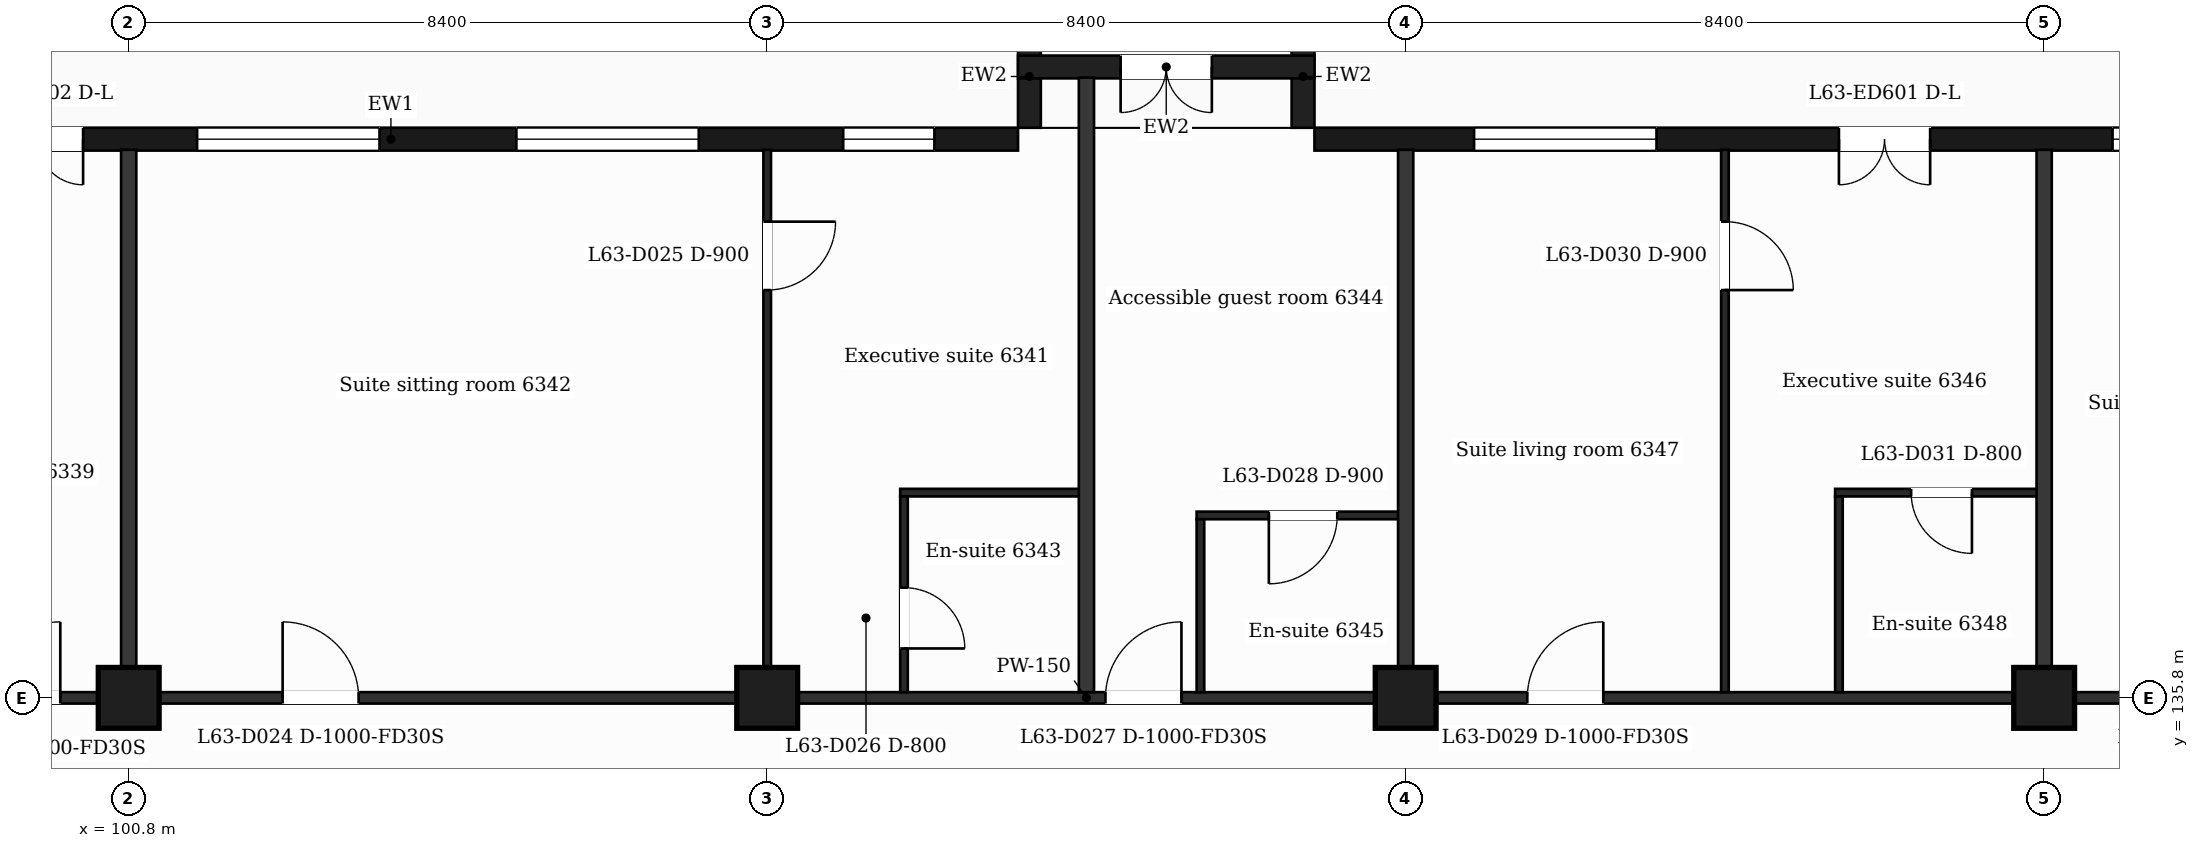
"""IFC4 building model, lengths in metres.
Left out: names, types, materials, properties, quantities, classifications, styles, units other than length and angle.
Written with IfcOpenShell. Run it as: python <this file> out.ifc"""

import sys

from ifc_helpers import new_model, si_unit, direction, frame, frame_2d, origin, origin_2d, place, context, subcontext, project, spatial, rectangle, extrude, element, fill, save


model = new_model("IFC4")
c1 = context("Model", 3, precision=1e-05, world=origin(), true_north=direction((0.0, 1.0)))
c2 = subcontext(c1, "Body", "Model", "MODEL_VIEW")
j1 = project(units=[si_unit("LENGTHUNIT", "METRE"), si_unit("PLANEANGLEUNIT", "RADIAN")], contexts=[c1])
p1 = place(None, origin())
s1 = spatial("IfcSite", under=j1, at=p1, CompositionType="ELEMENT")
p2 = place(p1, origin())
s2 = spatial("IfcBuilding", under=s1, at=p2, CompositionType="ELEMENT")
p3 = place(p2, frame((0.0, 0.0, 262.7)))
s3 = spatial("IfcBuildingStorey", under=s2, at=p3, CompositionType="ELEMENT", Elevation=262.7)
for number, where, z_axis, x_axis in (
    (1, (100.8, 135.8, 0.0), (0.0, 0.0, 1.0), (1.0, 0.0, 0.0)),
    (2, (109.2, 135.8, 0.0), (0.0, 0.0, 1.0), (1.0, 0.0, 0.0)),
    (3, (117.6, 135.8, 0.0), (0.0, 0.0, 1.0), (1.0, 0.0, 0.0)),
    (4, (126.0, 135.8, 0.0), (0.0, 0.0, 1.0), (1.0, 0.0, 0.0)),
):
    element("IfcColumn", number, at=place(p3, frame(where, z_axis=z_axis, x_axis=x_axis)), inside=s3, PredefinedType="COLUMN", context=c2, shape_type="SweptSolid", body=[
        extrude(rectangle(XDim=0.8, YDim=0.8, at=origin_2d()), origin(), (0.0, 0.0, 1.0), 3.7),
    ])
p4 = place(p3, frame((130.65, 143.15, 0.0), z_axis=(0.0, 0.0, 1.0), x_axis=(-1.0, 0.0, 0.0)))
e5 = element("IfcWall", 5, at=p4, inside=s3, PredefinedType="SOLIDWALL", context=c2, shape_type="SweptSolid", body=[
    extrude(rectangle(XDim=14.25, YDim=0.3, at=frame_2d((7.125, 0.0))), origin(), (0.0, 0.0, 1.0), 3.38),
])
p5 = place(p4, frame((1.35, 0.0, 0.9)))
e6 = element("IfcOpeningElement", 6, at=p5, cuts=e5, PredefinedType="OPENING", context=c2, shape_type="SweptSolid", body=[
    extrude(rectangle(XDim=2.4, YDim=2.1, at=frame_2d((1.2, 1.05))), frame((0.0, 0.16, 0.0), z_axis=(0.0, -1.0, 0.0), x_axis=(1.0, 0.0, 0.0)), (0.0, 0.0, 1.0), 0.32),
])
p6 = place(p4, frame((6.15, 0.0, 0.0)))
e7 = element("IfcOpeningElement", 7, at=p6, cuts=e5, PredefinedType="OPENING", context=c2, shape_type="SweptSolid", body=[
    extrude(rectangle(XDim=1.2, YDim=2.4, at=frame_2d((0.6, 1.2))), frame((0.0, 0.16, 0.0), z_axis=(0.0, -1.0, 0.0), x_axis=(1.0, 0.0, 0.0)), (0.0, 0.0, 1.0), 0.32),
])
p7 = place(p4, frame((9.75, 0.0, 0.9)))
e8 = element("IfcOpeningElement", 8, at=p7, cuts=e5, PredefinedType="OPENING", context=c2, shape_type="SweptSolid", body=[
    extrude(rectangle(XDim=2.4, YDim=2.1, at=frame_2d((1.2, 1.05))), frame((0.0, 0.16, 0.0), z_axis=(0.0, -1.0, 0.0), x_axis=(1.0, 0.0, 0.0)), (0.0, 0.0, 1.0), 0.32),
])
p8 = place(p3, frame((112.5, 143.15, 0.0), z_axis=(0.0, 0.0, 1.0), x_axis=(-1.0, 0.0, 0.0)))
e9 = element("IfcWall", 9, at=p8, inside=s3, PredefinedType="SOLIDWALL", context=c2, shape_type="SweptSolid", body=[
    extrude(rectangle(XDim=16.5, YDim=0.3, at=frame_2d((8.25, 0.0))), origin(), (0.0, 0.0, 1.0), 3.38),
])
p9 = place(p8, frame((1.1, 0.0, 0.9)))
e10 = element("IfcOpeningElement", 10, at=p9, cuts=e9, PredefinedType="OPENING", context=c2, shape_type="SweptSolid", body=[
    extrude(rectangle(XDim=1.2, YDim=2.1, at=frame_2d((0.6, 1.05))), frame((0.0, 0.16, 0.0), z_axis=(0.0, -1.0, 0.0), x_axis=(1.0, 0.0, 0.0)), (0.0, 0.0, 1.0), 0.32),
])
p10 = place(p8, frame((4.2, 0.0, 0.9)))
e11 = element("IfcOpeningElement", 11, at=p10, cuts=e9, PredefinedType="OPENING", context=c2, shape_type="SweptSolid", body=[
    extrude(rectangle(XDim=2.4, YDim=2.1, at=frame_2d((1.2, 1.05))), frame((0.0, 0.16, 0.0), z_axis=(0.0, -1.0, 0.0), x_axis=(1.0, 0.0, 0.0)), (0.0, 0.0, 1.0), 0.32),
])
p11 = place(p8, frame((8.4, 0.0, 0.9)))
e12 = element("IfcOpeningElement", 12, at=p11, cuts=e9, PredefinedType="OPENING", context=c2, shape_type="SweptSolid", body=[
    extrude(rectangle(XDim=2.4, YDim=2.1, at=frame_2d((1.2, 1.05))), frame((0.0, 0.16, 0.0), z_axis=(0.0, -1.0, 0.0), x_axis=(1.0, 0.0, 0.0)), (0.0, 0.0, 1.0), 0.32),
])
p12 = place(p8, frame((12.3, 0.0, 0.0)))
e13 = element("IfcOpeningElement", 13, at=p12, cuts=e9, PredefinedType="OPENING", context=c2, shape_type="SweptSolid", body=[
    extrude(rectangle(XDim=1.2, YDim=2.4, at=frame_2d((0.6, 1.2))), frame((0.0, 0.16, 0.0), z_axis=(0.0, -1.0, 0.0), x_axis=(1.0, 0.0, 0.0)), (0.0, 0.0, 1.0), 0.32),
])
p13 = place(p8, frame((14.1, 0.0, 0.9)))
e14 = element("IfcOpeningElement", 14, at=p13, cuts=e9, PredefinedType="OPENING", context=c2, shape_type="SweptSolid", body=[
    extrude(rectangle(XDim=1.2, YDim=2.1, at=frame_2d((0.6, 1.05))), frame((0.0, 0.16, 0.0), z_axis=(0.0, -1.0, 0.0), x_axis=(1.0, 0.0, 0.0)), (0.0, 0.0, 1.0), 0.32),
])
for number, where, z_axis, x_axis in (
    (15, (116.25, 143.3, 0.0), (0.0, 0.0, 1.0), (0.0, 1.0, 0.0)),
    (16, (112.65, 143.3, 0.0), (0.0, 0.0, 1.0), (0.0, 1.0, 0.0)),
):
    element("IfcWall", number, at=place(p3, frame(where, z_axis=z_axis, x_axis=x_axis)), inside=s3, PredefinedType="SOLIDWALL", context=c2, shape_type="SweptSolid", body=[
        extrude(rectangle(XDim=1.35, YDim=0.3, at=frame_2d((0.675, 0.0))), origin(), (0.0, 0.0, 1.0), 3.38),
    ])
p14 = place(p3, frame((116.4, 144.1, 0.0), z_axis=(0.0, 0.0, 1.0), x_axis=(-1.0, 0.0, 0.0)))
e17 = element("IfcWall", 17, at=p14, inside=s3, PredefinedType="SOLIDWALL", context=c2, shape_type="SweptSolid", body=[
    extrude(rectangle(XDim=3.9, YDim=0.3, at=frame_2d((1.95, 0.0))), origin(), (0.0, 0.0, 1.0), 3.38),
])
p15 = place(p14, frame((1.35, 0.0, 0.0)))
e18 = element("IfcOpeningElement", 18, at=p15, cuts=e17, PredefinedType="OPENING", context=c2, shape_type="SweptSolid", body=[
    extrude(rectangle(XDim=1.2, YDim=2.4, at=frame_2d((0.6, 1.2))), frame((0.0, 0.16, 0.0), z_axis=(0.0, -1.0, 0.0), x_axis=(1.0, 0.0, 0.0)), (0.0, 0.0, 1.0), 0.32),
])
p16 = place(p3, frame((90.895, 135.8, 0.0), z_axis=(0.0, 0.0, 1.0), x_axis=(1.0, 0.0, 0.0)))
e19 = element("IfcWall", 19, at=p16, inside=s3, PredefinedType="PARTITIONING", context=c2, shape_type="SweptSolid", body=[
    extrude(rectangle(XDim=45.011, YDim=0.15, at=frame_2d((22.505, 0.0))), origin(), (0.0, 0.0, 1.0), 3.38),
])
p17 = place(p16, frame((8.005, 0.0, 0.0)))
e20 = element("IfcOpeningElement", 20, at=p17, cuts=e19, PredefinedType="OPENING", context=c2, shape_type="SweptSolid", body=[
    extrude(rectangle(XDim=1.0, YDim=2.1, at=frame_2d((0.5, 1.05))), frame((0.0, 0.085, 0.0), z_axis=(0.0, -1.0, 0.0), x_axis=(1.0, 0.0, 0.0)), (0.0, 0.0, 1.0), 0.17),
])
p18 = place(p16, frame((11.93, 0.0, 0.0)))
e21 = element("IfcOpeningElement", 21, at=p18, cuts=e19, PredefinedType="OPENING", context=c2, shape_type="SweptSolid", body=[
    extrude(rectangle(XDim=1.0, YDim=2.1, at=frame_2d((0.5, 1.05))), frame((0.0, 0.085, 0.0), z_axis=(0.0, -1.0, 0.0), x_axis=(1.0, 0.0, 0.0)), (0.0, 0.0, 1.0), 0.17),
])
p19 = place(p16, frame((22.755, 0.0, 0.0)))
e22 = element("IfcOpeningElement", 22, at=p19, cuts=e19, PredefinedType="OPENING", context=c2, shape_type="SweptSolid", body=[
    extrude(rectangle(XDim=1.0, YDim=2.1, at=frame_2d((0.5, 1.05))), frame((0.0, 0.085, 0.0), z_axis=(0.0, -1.0, 0.0), x_axis=(1.0, 0.0, 0.0)), (0.0, 0.0, 1.0), 0.17),
])
p20 = place(p16, frame((28.305, 0.0, 0.0)))
e23 = element("IfcOpeningElement", 23, at=p20, cuts=e19, PredefinedType="OPENING", context=c2, shape_type="SweptSolid", body=[
    extrude(rectangle(XDim=1.0, YDim=2.1, at=frame_2d((0.5, 1.05))), frame((0.0, 0.085, 0.0), z_axis=(0.0, -1.0, 0.0), x_axis=(1.0, 0.0, 0.0)), (0.0, 0.0, 1.0), 0.17),
])
p21 = place(p16, frame((37.195, 0.0, 0.0)))
e24 = element("IfcOpeningElement", 24, at=p21, cuts=e19, PredefinedType="OPENING", context=c2, shape_type="SweptSolid", body=[
    extrude(rectangle(XDim=1.0, YDim=2.1, at=frame_2d((0.5, 1.05))), frame((0.0, 0.085, 0.0), z_axis=(0.0, -1.0, 0.0), x_axis=(1.0, 0.0, 0.0)), (0.0, 0.0, 1.0), 0.17),
])
p22 = place(p3, frame((114.85, 138.2, 0.0), z_axis=(0.0, 0.0, 1.0), x_axis=(1.0, 0.0, 0.0)))
e25 = element("IfcWall", 25, at=p22, inside=s3, PredefinedType="PARTITIONING", context=c2, shape_type="SweptSolid", body=[
    extrude(rectangle(XDim=2.75, YDim=0.1, at=frame_2d((1.375, 0.0))), origin(), (0.0, 0.0, 1.0), 3.38),
])
p23 = place(p22, frame((0.95, 0.0, 0.0)))
e26 = element("IfcOpeningElement", 26, at=p23, cuts=e25, PredefinedType="OPENING", context=c2, shape_type="SweptSolid", body=[
    extrude(rectangle(XDim=0.9, YDim=2.1, at=frame_2d((0.45, 1.05))), frame((0.0, 0.06, 0.0), z_axis=(0.0, -1.0, 0.0), x_axis=(1.0, 0.0, 0.0)), (0.0, 0.0, 1.0), 0.12),
])
p24 = place(p3, frame((110.95, 138.5, 0.0), z_axis=(0.0, 0.0, 1.0), x_axis=(1.0, 0.0, 0.0)))
e27 = element("IfcWall", 27, at=p24, inside=s3, PredefinedType="PARTITIONING", context=c2, shape_type="SweptSolid", body=[
    extrude(rectangle(XDim=2.45, YDim=0.1, at=frame_2d((1.225, 0.0))), origin(), (0.0, 0.0, 1.0), 3.38),
])
p25 = place(p3, frame((123.25, 138.5, 0.0), z_axis=(0.0, 0.0, 1.0), x_axis=(1.0, 0.0, 0.0)))
e28 = element("IfcWall", 28, at=p25, inside=s3, PredefinedType="PARTITIONING", context=c2, shape_type="SweptSolid", body=[
    extrude(rectangle(XDim=2.75, YDim=0.1, at=frame_2d((1.375, 0.0))), origin(), (0.0, 0.0, 1.0), 3.38),
])
p26 = place(p25, frame((1.0, 0.0, 0.0)))
e29 = element("IfcOpeningElement", 29, at=p26, cuts=e28, PredefinedType="OPENING", context=c2, shape_type="SweptSolid", body=[
    extrude(rectangle(XDim=0.8, YDim=2.1, at=frame_2d((0.4, 1.05))), frame((0.0, 0.06, 0.0), z_axis=(0.0, -1.0, 0.0), x_axis=(1.0, 0.0, 0.0)), (0.0, 0.0, 1.0), 0.12),
])
p27 = place(p3, frame((100.8, 135.875, 0.0), z_axis=(0.0, 0.0, 1.0), x_axis=(0.0, 1.0, 0.0)))
e30 = element("IfcWall", 30, at=p27, inside=s3, PredefinedType="PARTITIONING", context=c2, shape_type="SweptSolid", body=[
    extrude(rectangle(XDim=7.135, YDim=0.2, at=frame_2d((3.567, 0.0))), origin(), (0.0, 0.0, 1.0), 3.38),
])
p28 = place(p3, frame((109.2, 135.875, 0.0), z_axis=(0.0, 0.0, 1.0), x_axis=(0.0, 1.0, 0.0)))
e31 = element("IfcWall", 31, at=p28, inside=s3, PredefinedType="PARTITIONING", context=c2, shape_type="SweptSolid", body=[
    extrude(rectangle(XDim=7.135, YDim=0.1, at=frame_2d((3.567, 0.0))), origin(), (0.0, 0.0, 1.0), 3.38),
])
p29 = place(p28, frame((5.29, 0.0, 0.0)))
e32 = element("IfcOpeningElement", 32, at=p29, cuts=e31, PredefinedType="OPENING", context=c2, shape_type="SweptSolid", body=[
    extrude(rectangle(XDim=0.9, YDim=2.1, at=frame_2d((0.45, 1.05))), frame((0.0, 0.06, 0.0), z_axis=(0.0, -1.0, 0.0), x_axis=(1.0, 0.0, 0.0)), (0.0, 0.0, 1.0), 0.12),
])
p30 = place(p3, frame((111.0, 135.875, 0.0), z_axis=(0.0, 0.0, 1.0), x_axis=(0.0, 1.0, 0.0)))
e33 = element("IfcWall", 33, at=p30, inside=s3, PredefinedType="PARTITIONING", context=c2, shape_type="SweptSolid", body=[
    extrude(rectangle(XDim=2.575, YDim=0.1, at=frame_2d((1.288, 0.0))), origin(), (0.0, 0.0, 1.0), 3.38),
])
p31 = place(p30, frame((0.575, 0.0, 0.0)))
e34 = element("IfcOpeningElement", 34, at=p31, cuts=e33, PredefinedType="OPENING", context=c2, shape_type="SweptSolid", body=[
    extrude(rectangle(XDim=0.8, YDim=2.1, at=frame_2d((0.4, 1.05))), frame((0.0, 0.06, 0.0), z_axis=(0.0, -1.0, 0.0), x_axis=(1.0, 0.0, 0.0)), (0.0, 0.0, 1.0), 0.12),
])
p32 = place(p3, frame((113.4, 135.875, 0.0), z_axis=(0.0, 0.0, 1.0), x_axis=(0.0, 1.0, 0.0)))
e35 = element("IfcWall", 35, at=p32, inside=s3, PredefinedType="PARTITIONING", context=c2, shape_type="SweptSolid", body=[
    extrude(rectangle(XDim=8.085, YDim=0.2, at=frame_2d((4.042, 0.0))), origin(), (0.0, 0.0, 1.0), 3.38),
])
p33 = place(p3, frame((114.9, 135.875, 0.0), z_axis=(0.0, 0.0, 1.0), x_axis=(0.0, 1.0, 0.0)))
e36 = element("IfcWall", 36, at=p33, inside=s3, PredefinedType="PARTITIONING", context=c2, shape_type="SweptSolid", body=[
    extrude(rectangle(XDim=2.275, YDim=0.1, at=frame_2d((1.137, 0.0))), origin(), (0.0, 0.0, 1.0), 3.38),
])
p34 = place(p3, frame((117.6, 135.875, 0.0), z_axis=(0.0, 0.0, 1.0), x_axis=(0.0, 1.0, 0.0)))
e37 = element("IfcWall", 37, at=p34, inside=s3, PredefinedType="PARTITIONING", context=c2, shape_type="SweptSolid", body=[
    extrude(rectangle(XDim=7.135, YDim=0.2, at=frame_2d((3.567, 0.0))), origin(), (0.0, 0.0, 1.0), 3.38),
])
p35 = place(p3, frame((121.8, 135.875, 0.0), z_axis=(0.0, 0.0, 1.0), x_axis=(0.0, 1.0, 0.0)))
e38 = element("IfcWall", 38, at=p35, inside=s3, PredefinedType="PARTITIONING", context=c2, shape_type="SweptSolid", body=[
    extrude(rectangle(XDim=7.135, YDim=0.1, at=frame_2d((3.567, 0.0))), origin(), (0.0, 0.0, 1.0), 3.38),
])
p36 = place(p35, frame((5.29, 0.0, 0.0)))
e39 = element("IfcOpeningElement", 39, at=p36, cuts=e38, PredefinedType="OPENING", context=c2, shape_type="SweptSolid", body=[
    extrude(rectangle(XDim=0.9, YDim=2.1, at=frame_2d((0.45, 1.05))), frame((0.0, 0.06, 0.0), z_axis=(0.0, -1.0, 0.0), x_axis=(1.0, 0.0, 0.0)), (0.0, 0.0, 1.0), 0.12),
])
p37 = place(p3, frame((123.3, 135.875, 0.0), z_axis=(0.0, 0.0, 1.0), x_axis=(0.0, 1.0, 0.0)))
e40 = element("IfcWall", 40, at=p37, inside=s3, PredefinedType="PARTITIONING", context=c2, shape_type="SweptSolid", body=[
    extrude(rectangle(XDim=2.575, YDim=0.1, at=frame_2d((1.288, 0.0))), origin(), (0.0, 0.0, 1.0), 3.38),
])
p38 = place(p3, frame((126.0, 135.875, 0.0), z_axis=(0.0, 0.0, 1.0), x_axis=(0.0, 1.0, 0.0)))
e41 = element("IfcWall", 41, at=p38, inside=s3, PredefinedType="PARTITIONING", context=c2, shape_type="SweptSolid", body=[
    extrude(rectangle(XDim=7.135, YDim=0.2, at=frame_2d((3.567, 0.0))), origin(), (0.0, 0.0, 1.0), 3.38),
])
p39 = place(p5, origin())
e42 = element("IfcWindow", 42, at=p39, inside=s3, PartitioningType="SINGLE_PANEL", PredefinedType="WINDOW", context=c2, shape_type="SweptSolid", body=[
    extrude(rectangle(XDim=2.4, YDim=2.1, at=frame_2d((1.2, 1.05))), frame((0.0, 0.03, 0.0), z_axis=(0.0, -1.0, 0.0), x_axis=(1.0, 0.0, 0.0)), (0.0, 0.0, 1.0), 0.06),
])
fill(e6, e42)
p40 = place(p6, origin())
e43 = element("IfcDoor", 43, at=p40, inside=s3, OperationType="DOUBLE_DOOR_SINGLE_SWING", PredefinedType="DOOR", context=c2, shape_type="SweptSolid", body=[
    extrude(rectangle(XDim=1.2, YDim=2.4, at=frame_2d((0.6, 1.2))), frame((0.0, 0.025, 0.0), z_axis=(0.0, -1.0, 0.0), x_axis=(1.0, 0.0, 0.0)), (0.0, 0.0, 1.0), 0.05),
])
fill(e7, e43)
p41 = place(p7, origin())
e44 = element("IfcWindow", 44, at=p41, inside=s3, PartitioningType="SINGLE_PANEL", PredefinedType="WINDOW", context=c2, shape_type="SweptSolid", body=[
    extrude(rectangle(XDim=2.4, YDim=2.1, at=frame_2d((1.2, 1.05))), frame((0.0, 0.03, 0.0), z_axis=(0.0, -1.0, 0.0), x_axis=(1.0, 0.0, 0.0)), (0.0, 0.0, 1.0), 0.06),
])
fill(e8, e44)
p42 = place(p9, origin())
e45 = element("IfcWindow", 45, at=p42, inside=s3, PartitioningType="SINGLE_PANEL", PredefinedType="WINDOW", context=c2, shape_type="SweptSolid", body=[
    extrude(rectangle(XDim=1.2, YDim=2.1, at=frame_2d((0.6, 1.05))), frame((0.0, 0.03, 0.0), z_axis=(0.0, -1.0, 0.0), x_axis=(1.0, 0.0, 0.0)), (0.0, 0.0, 1.0), 0.06),
])
fill(e10, e45)
p43 = place(p10, origin())
e46 = element("IfcWindow", 46, at=p43, inside=s3, PartitioningType="SINGLE_PANEL", PredefinedType="WINDOW", context=c2, shape_type="SweptSolid", body=[
    extrude(rectangle(XDim=2.4, YDim=2.1, at=frame_2d((1.2, 1.05))), frame((0.0, 0.03, 0.0), z_axis=(0.0, -1.0, 0.0), x_axis=(1.0, 0.0, 0.0)), (0.0, 0.0, 1.0), 0.06),
])
fill(e11, e46)
p44 = place(p11, origin())
e47 = element("IfcWindow", 47, at=p44, inside=s3, PartitioningType="SINGLE_PANEL", PredefinedType="WINDOW", context=c2, shape_type="SweptSolid", body=[
    extrude(rectangle(XDim=2.4, YDim=2.1, at=frame_2d((1.2, 1.05))), frame((0.0, 0.03, 0.0), z_axis=(0.0, -1.0, 0.0), x_axis=(1.0, 0.0, 0.0)), (0.0, 0.0, 1.0), 0.06),
])
fill(e12, e47)
p45 = place(p12, origin())
e48 = element("IfcDoor", 48, at=p45, inside=s3, OperationType="DOUBLE_DOOR_SINGLE_SWING", PredefinedType="DOOR", context=c2, shape_type="SweptSolid", body=[
    extrude(rectangle(XDim=1.2, YDim=2.4, at=frame_2d((0.6, 1.2))), frame((0.0, 0.025, 0.0), z_axis=(0.0, -1.0, 0.0), x_axis=(1.0, 0.0, 0.0)), (0.0, 0.0, 1.0), 0.05),
])
fill(e13, e48)
p46 = place(p15, origin())
e49 = element("IfcDoor", 49, at=p46, inside=s3, OperationType="DOUBLE_DOOR_SINGLE_SWING", PredefinedType="DOOR", context=c2, shape_type="SweptSolid", body=[
    extrude(rectangle(XDim=1.2, YDim=2.4, at=frame_2d((0.6, 1.2))), frame((0.0, 0.025, 0.0), z_axis=(0.0, -1.0, 0.0), x_axis=(1.0, 0.0, 0.0)), (0.0, 0.0, 1.0), 0.05),
])
fill(e18, e49)
p47 = place(p17, origin())
e50 = element("IfcDoor", 50, at=p47, inside=s3, OperationType="SINGLE_SWING_RIGHT", PredefinedType="DOOR", context=c2, shape_type="SweptSolid", body=[
    extrude(rectangle(XDim=1.0, YDim=2.1, at=frame_2d((0.5, 1.05))), frame((0.0, 0.025, 0.0), z_axis=(0.0, -1.0, 0.0), x_axis=(1.0, 0.0, 0.0)), (0.0, 0.0, 1.0), 0.05),
])
fill(e20, e50)
p48 = place(p18, origin())
e51 = element("IfcDoor", 51, at=p48, inside=s3, OperationType="SINGLE_SWING_LEFT", PredefinedType="DOOR", context=c2, shape_type="SweptSolid", body=[
    extrude(rectangle(XDim=1.0, YDim=2.1, at=frame_2d((0.5, 1.05))), frame((0.0, 0.025, 0.0), z_axis=(0.0, -1.0, 0.0), x_axis=(1.0, 0.0, 0.0)), (0.0, 0.0, 1.0), 0.05),
])
fill(e21, e51)
p49 = place(p29, origin())
e52 = element("IfcDoor", 52, at=p49, inside=s3, OperationType="SINGLE_SWING_RIGHT", PredefinedType="DOOR", context=c2, shape_type="SweptSolid", body=[
    extrude(rectangle(XDim=0.9, YDim=2.1, at=frame_2d((0.45, 1.05))), frame((0.0, 0.025, 0.0), z_axis=(0.0, -1.0, 0.0), x_axis=(1.0, 0.0, 0.0)), (0.0, 0.0, 1.0), 0.05),
])
fill(e32, e52)
p50 = place(p31, origin())
e53 = element("IfcDoor", 53, at=p50, inside=s3, OperationType="SINGLE_SWING_LEFT", PredefinedType="DOOR", context=c2, shape_type="SweptSolid", body=[
    extrude(rectangle(XDim=0.8, YDim=2.1, at=frame_2d((0.4, 1.05))), frame((0.0, 0.025, 0.0), z_axis=(0.0, -1.0, 0.0), x_axis=(1.0, 0.0, 0.0)), (0.0, 0.0, 1.0), 0.05),
])
fill(e34, e53)
p51 = place(p19, origin())
e54 = element("IfcDoor", 54, at=p51, inside=s3, OperationType="SINGLE_SWING_RIGHT", PredefinedType="DOOR", context=c2, shape_type="SweptSolid", body=[
    extrude(rectangle(XDim=1.0, YDim=2.1, at=frame_2d((0.5, 1.05))), frame((0.0, 0.025, 0.0), z_axis=(0.0, -1.0, 0.0), x_axis=(1.0, 0.0, 0.0)), (0.0, 0.0, 1.0), 0.05),
])
fill(e22, e54)
p52 = place(p23, origin())
e55 = element("IfcDoor", 55, at=p52, inside=s3, OperationType="SINGLE_SWING_LEFT", PredefinedType="DOOR", context=c2, shape_type="SweptSolid", body=[
    extrude(rectangle(XDim=0.9, YDim=2.1, at=frame_2d((0.45, 1.05))), frame((0.0, 0.025, 0.0), z_axis=(0.0, -1.0, 0.0), x_axis=(1.0, 0.0, 0.0)), (0.0, 0.0, 1.0), 0.05),
])
fill(e26, e55)
p53 = place(p20, origin())
e56 = element("IfcDoor", 56, at=p53, inside=s3, OperationType="SINGLE_SWING_RIGHT", PredefinedType="DOOR", context=c2, shape_type="SweptSolid", body=[
    extrude(rectangle(XDim=1.0, YDim=2.1, at=frame_2d((0.5, 1.05))), frame((0.0, 0.025, 0.0), z_axis=(0.0, -1.0, 0.0), x_axis=(1.0, 0.0, 0.0)), (0.0, 0.0, 1.0), 0.05),
])
fill(e23, e56)
p54 = place(p36, origin())
e57 = element("IfcDoor", 57, at=p54, inside=s3, OperationType="SINGLE_SWING_LEFT", PredefinedType="DOOR", context=c2, shape_type="SweptSolid", body=[
    extrude(rectangle(XDim=0.9, YDim=2.1, at=frame_2d((0.45, 1.05))), frame((0.0, 0.025, 0.0), z_axis=(0.0, -1.0, 0.0), x_axis=(1.0, 0.0, 0.0)), (0.0, 0.0, 1.0), 0.05),
])
fill(e39, e57)
p55 = place(p26, origin())
e58 = element("IfcDoor", 58, at=p55, inside=s3, OperationType="SINGLE_SWING_RIGHT", PredefinedType="DOOR", context=c2, shape_type="SweptSolid", body=[
    extrude(rectangle(XDim=0.8, YDim=2.1, at=frame_2d((0.4, 1.05))), frame((0.0, 0.025, 0.0), z_axis=(0.0, -1.0, 0.0), x_axis=(1.0, 0.0, 0.0)), (0.0, 0.0, 1.0), 0.05),
])
fill(e29, e58)
save(model, sys.argv[1])
